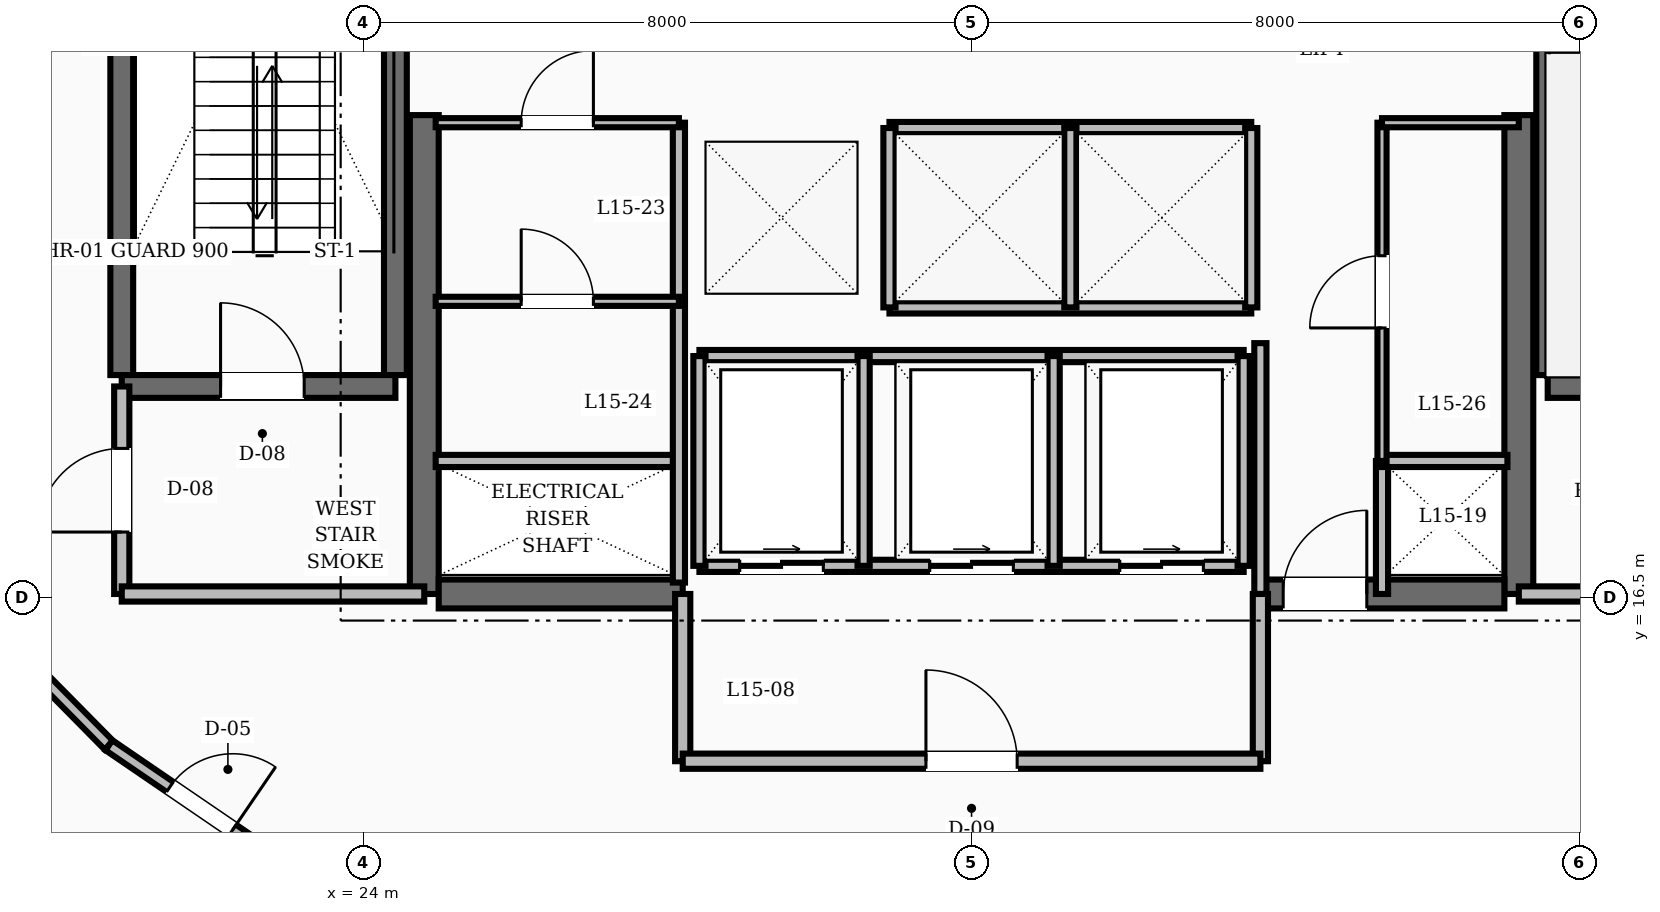
"""IFC4 building model, lengths in metres.
Left out: names, types, materials, properties, quantities, classifications, styles, units other than length and angle.
Written with IfcOpenShell. Run it as: python <this file> out.ifc"""

import sys

from ifc_helpers import new_model, si_unit, direction, frame, frame_2d, origin, place, context, subcontext, project, spatial, rectangle, extrude, element, fill, save


model = new_model("IFC4")
c1 = context("Model", 3, precision=1e-05, world=origin(), true_north=direction((0.0, 1.0)))
c2 = subcontext(c1, "Body", "Model", "MODEL_VIEW")
j1 = project(units=[si_unit("LENGTHUNIT", "METRE"), si_unit("PLANEANGLEUNIT", "RADIAN")], contexts=[c1])
p1 = place(None, origin())
s1 = spatial("IfcSite", under=j1, at=p1, CompositionType="ELEMENT")
p2 = place(p1, origin())
s2 = spatial("IfcBuilding", under=s1, at=p2, CompositionType="ELEMENT")
p3 = place(p2, frame((0.0, 0.0, 62.8)))
s3 = spatial("IfcBuildingStorey", under=s2, at=p3, CompositionType="ELEMENT", Elevation=62.8)
for number, where, z_axis, x_axis in (
    (1, (24.8, 16.55, 0.0), (0.0, 0.0, 1.0), (0.0, 1.0, 0.0)),
    (2, (39.2, 16.55, 0.0), (0.0, 0.0, 1.0), (0.0, 1.0, 0.0)),
):
    element("IfcWall", number, at=place(p3, frame(where, z_axis=z_axis, x_axis=x_axis)), inside=s3, PredefinedType="SHEAR", context=c2, shape_type="SweptSolid", body=[
        extrude(rectangle(XDim=6.3, YDim=0.38, at=frame_2d((3.15, 0.0))), origin(), (0.0, 0.0, 1.0), 3.6),
    ])
p4 = place(p3, frame((24.99, 16.55, 0.0), z_axis=(0.0, 0.0, 1.0), x_axis=(1.0, 0.0, 0.0)))
e3 = element("IfcWall", 3, at=p4, inside=s3, PredefinedType="SHEAR", context=c2, shape_type="SweptSolid", body=[
    extrude(rectangle(XDim=3.21, YDim=0.38, at=frame_2d((1.605, 0.0))), origin(), (0.0, 0.0, 1.0), 3.6),
])
p5 = place(p3, frame((35.8, 16.55, 0.0), z_axis=(0.0, 0.0, 1.0), x_axis=(1.0, 0.0, 0.0)))
e4 = element("IfcWall", 4, at=p5, inside=s3, PredefinedType="SHEAR", context=c2, shape_type="SweptSolid", body=[
    extrude(rectangle(XDim=3.21, YDim=0.38, at=frame_2d((1.605, 0.0))), origin(), (0.0, 0.0, 1.0), 3.6),
])
p6 = place(p5, frame((0.3, 0.0, 0.0)))
e5 = element("IfcOpeningElement", 5, at=p6, cuts=e4, PredefinedType="OPENING", context=c2, shape_type="SweptSolid", body=[
    extrude(rectangle(XDim=1.1, YDim=2.1, at=frame_2d((0.55, 1.05))), frame((0.0, 0.2, 0.0), z_axis=(0.0, -1.0, 0.0), x_axis=(1.0, 0.0, 0.0)), (0.0, 0.0, 1.0), 0.4),
])
for number, where, z_axis, x_axis in (
    (6, (20.82, 19.43, 0.0), (0.0, 0.0, 1.0), (0.0, 1.0, 0.0)),
    (7, (24.42, 19.43, 0.0), (0.0, 0.0, 1.0), (0.0, 1.0, 0.0)),
):
    element("IfcWall", number, at=place(p3, frame(where, z_axis=z_axis, x_axis=x_axis)), inside=s3, PredefinedType="SHEAR", context=c2, shape_type="SweptSolid", body=[
        extrude(rectangle(XDim=8.74, YDim=0.3, at=frame_2d((4.37, 0.0))), origin(), (0.0, 0.0, 1.0), 3.6),
    ])
p7 = place(p3, frame((20.82, 19.28, 0.0), z_axis=(0.0, 0.0, 1.0), x_axis=(1.0, 0.0, 0.0)))
e8 = element("IfcWall", 8, at=p7, inside=s3, PredefinedType="SHEAR", context=c2, shape_type="SweptSolid", body=[
    extrude(rectangle(XDim=3.6, YDim=0.3, at=frame_2d((1.8, 0.0))), origin(), (0.0, 0.0, 1.0), 3.6),
])
p8 = place(p7, frame((1.3, 0.0, 0.0)))
e9 = element("IfcOpeningElement", 9, at=p8, cuts=e8, PredefinedType="OPENING", context=c2, shape_type="SweptSolid", body=[
    extrude(rectangle(XDim=1.1, YDim=2.1, at=frame_2d((0.55, 1.05))), frame((0.0, 0.16, 0.0), z_axis=(0.0, -1.0, 0.0), x_axis=(1.0, 0.0, 0.0)), (0.0, 0.0, 1.0), 0.32),
])
p9 = place(p3, frame((39.58, 19.43, 0.0), z_axis=(0.0, 0.0, 1.0), x_axis=(0.0, 1.0, 0.0)))
e10 = element("IfcWall", 10, at=p9, inside=s3, PredefinedType="SHEAR", context=c2, shape_type="SweptSolid", body=[
    extrude(rectangle(XDim=8.74, YDim=0.3, at=frame_2d((4.37, 0.0))), origin(), (0.0, 0.0, 1.0), 3.6),
])
p10 = place(p3, frame((39.58, 19.28, 0.0), z_axis=(0.0, 0.0, 1.0), x_axis=(1.0, 0.0, 0.0)))
e11 = element("IfcWall", 11, at=p10, inside=s3, PredefinedType="SHEAR", context=c2, shape_type="SweptSolid", body=[
    extrude(rectangle(XDim=3.6, YDim=0.3, at=frame_2d((1.8, 0.0))), origin(), (0.0, 0.0, 1.0), 3.6),
])
p11 = place(p3, frame((20.82, 16.55, 0.0), z_axis=(0.0, 0.0, 1.0), x_axis=(0.0, 1.0, 0.0)))
e12 = element("IfcWall", 12, at=p11, inside=s3, PredefinedType="SOLIDWALL", context=c2, shape_type="SweptSolid", body=[
    extrude(rectangle(XDim=2.73, YDim=0.2, at=frame_2d((1.365, 0.0))), origin(), (0.0, 0.0, 1.0), 2.71),
])
p12 = place(p11, frame((0.815, 0.0, 0.0)))
e13 = element("IfcOpeningElement", 13, at=p12, cuts=e12, PredefinedType="OPENING", context=c2, shape_type="SweptSolid", body=[
    extrude(rectangle(XDim=1.1, YDim=2.1, at=frame_2d((0.55, 1.05))), frame((0.0, 0.11, 0.0), z_axis=(0.0, -1.0, 0.0), x_axis=(1.0, 0.0, 0.0)), (0.0, 0.0, 1.0), 0.22),
])
for number, where, z_axis, x_axis in (
    (14, (20.82, 16.55, 0.0), (0.0, 0.0, 1.0), (1.0, 0.0, 0.0)),
    (15, (39.2, 16.55, 0.0), (0.0, 0.0, 1.0), (1.0, 0.0, 0.0)),
):
    element("IfcWall", number, at=place(p3, frame(where, z_axis=z_axis, x_axis=x_axis)), inside=s3, PredefinedType="SOLIDWALL", context=c2, shape_type="SweptSolid", body=[
        extrude(rectangle(XDim=3.98, YDim=0.2, at=frame_2d((1.99, 0.0))), origin(), (0.0, 0.0, 1.0), 2.71),
    ])
p13 = place(p3, frame((35.8, 16.55, 0.0), z_axis=(0.0, 0.0, 1.0), x_axis=(0.0, 1.0, 0.0)))
e16 = element("IfcWall", 16, at=p13, inside=s3, PredefinedType="SOLIDWALL", context=c2, shape_type="SweptSolid", body=[
    extrude(rectangle(XDim=3.3, YDim=0.16, at=frame_2d((1.65, 0.0))), origin(), (0.0, 0.0, 1.0), 2.71),
])
p14 = place(p3, frame((37.4, 16.55, 0.0), z_axis=(0.0, 0.0, 1.0), x_axis=(0.0, 1.0, 0.0)))
e17 = element("IfcWall", 17, at=p14, inside=s3, PredefinedType="SOLIDWALL", context=c2, shape_type="SweptSolid", body=[
    extrude(rectangle(XDim=1.75, YDim=0.16, at=frame_2d((0.875, 0.0))), origin(), (0.0, 0.0, 1.0), 2.71),
])
for number, where, z_axis, x_axis in (
    (18, (28.2, 14.35, 0.0), (0.0, 0.0, 1.0), (0.0, 1.0, 0.0)),
    (19, (35.8, 14.35, 0.0), (0.0, 0.0, 1.0), (0.0, 1.0, 0.0)),
):
    element("IfcWall", number, at=place(p3, frame(where, z_axis=z_axis, x_axis=x_axis)), inside=s3, PredefinedType="SOLIDWALL", context=c2, shape_type="SweptSolid", body=[
        extrude(rectangle(XDim=2.2, YDim=0.2, at=frame_2d((1.1, 0.0))), origin(), (0.0, 0.0, 1.0), 2.71),
    ])
p15 = place(p3, frame((28.2, 14.35, 0.0), z_axis=(0.0, 0.0, 1.0), x_axis=(1.0, 0.0, 0.0)))
e20 = element("IfcWall", 20, at=p15, inside=s3, PredefinedType="SOLIDWALL", context=c2, shape_type="SweptSolid", body=[
    extrude(rectangle(XDim=7.6, YDim=0.2, at=frame_2d((3.8, 0.0))), origin(), (0.0, 0.0, 1.0), 2.71),
])
p16 = place(p15, frame((3.2, 0.0, 0.0)))
e21 = element("IfcOpeningElement", 21, at=p16, cuts=e20, PredefinedType="OPENING", context=c2, shape_type="SweptSolid", body=[
    extrude(rectangle(XDim=1.2, YDim=2.1, at=frame_2d((0.6, 1.05))), frame((0.0, 0.11, 0.0), z_axis=(0.0, -1.0, 0.0), x_axis=(1.0, 0.0, 0.0)), (0.0, 0.0, 1.0), 0.22),
])
for number, where, z_axis, x_axis in (
    (22, (30.92, 22.68, 0.0), (0.0, 0.0, 1.0), (1.0, 0.0, 0.0)),
    (23, (30.92, 20.32, 0.0), (0.0, 0.0, 1.0), (1.0, 0.0, 0.0)),
):
    element("IfcWall", number, at=place(p3, frame(where, z_axis=z_axis, x_axis=x_axis)), inside=s3, PredefinedType="SOLIDWALL", context=c2, shape_type="SweptSolid", body=[
        extrude(rectangle(XDim=4.76, YDim=0.16, at=frame_2d((2.38, 0.0))), origin(), (0.0, 0.0, 1.0), 2.71),
    ])
for number, where, z_axis, x_axis in (
    (24, (30.92, 20.32, 0.0), (0.0, 0.0, 1.0), (0.0, 1.0, 0.0)),
    (25, (33.3, 20.32, 0.0), (0.0, 0.0, 1.0), (0.0, 1.0, 0.0)),
    (26, (35.68, 20.32, 0.0), (0.0, 0.0, 1.0), (0.0, 1.0, 0.0)),
):
    element("IfcWall", number, at=place(p3, frame(where, z_axis=z_axis, x_axis=x_axis)), inside=s3, PredefinedType="SOLIDWALL", context=c2, shape_type="SweptSolid", body=[
        extrude(rectangle(XDim=2.36, YDim=0.16, at=frame_2d((1.18, 0.0))), origin(), (0.0, 0.0, 1.0), 2.71),
    ])
p17 = place(p3, frame((28.42, 16.92, 0.0), z_axis=(0.0, 0.0, 1.0), x_axis=(1.0, 0.0, 0.0)))
e27 = element("IfcWall", 27, at=p17, inside=s3, PredefinedType="SOLIDWALL", context=c2, shape_type="SweptSolid", body=[
    extrude(rectangle(XDim=7.16, YDim=0.16, at=frame_2d((3.58, 0.0))), origin(), (0.0, 0.0, 1.0), 2.71),
])
p18 = place(p17, frame((0.53, 0.0, 0.0)))
e28 = element("IfcOpeningElement", 28, at=p18, cuts=e27, PredefinedType="OPENING", context=c2, shape_type="SweptSolid", body=[
    extrude(rectangle(XDim=1.1, YDim=2.15, at=frame_2d((0.55, 1.075))), frame((0.0, 0.09, 0.0), z_axis=(0.0, -1.0, 0.0), x_axis=(1.0, 0.0, 0.0)), (0.0, 0.0, 1.0), 0.18),
])
p19 = place(p17, frame((3.03, 0.0, 0.0)))
e29 = element("IfcOpeningElement", 29, at=p19, cuts=e27, PredefinedType="OPENING", context=c2, shape_type="SweptSolid", body=[
    extrude(rectangle(XDim=1.1, YDim=2.15, at=frame_2d((0.55, 1.075))), frame((0.0, 0.09, 0.0), z_axis=(0.0, -1.0, 0.0), x_axis=(1.0, 0.0, 0.0)), (0.0, 0.0, 1.0), 0.18),
])
p20 = place(p17, frame((5.53, 0.0, 0.0)))
e30 = element("IfcOpeningElement", 30, at=p20, cuts=e27, PredefinedType="OPENING", context=c2, shape_type="SweptSolid", body=[
    extrude(rectangle(XDim=1.1, YDim=2.15, at=frame_2d((0.55, 1.075))), frame((0.0, 0.09, 0.0), z_axis=(0.0, -1.0, 0.0), x_axis=(1.0, 0.0, 0.0)), (0.0, 0.0, 1.0), 0.18),
])
p21 = place(p3, frame((28.42, 19.68, 0.0), z_axis=(0.0, 0.0, 1.0), x_axis=(1.0, 0.0, 0.0)))
e31 = element("IfcWall", 31, at=p21, inside=s3, PredefinedType="SOLIDWALL", context=c2, shape_type="SweptSolid", body=[
    extrude(rectangle(XDim=7.16, YDim=0.16, at=frame_2d((3.58, 0.0))), origin(), (0.0, 0.0, 1.0), 2.71),
])
for number, where, z_axis, x_axis in (
    (32, (28.42, 16.92, 0.0), (0.0, 0.0, 1.0), (0.0, 1.0, 0.0)),
    (33, (30.58, 16.92, 0.0), (0.0, 0.0, 1.0), (0.0, 1.0, 0.0)),
    (34, (33.08, 16.92, 0.0), (0.0, 0.0, 1.0), (0.0, 1.0, 0.0)),
    (35, (35.58, 16.92, 0.0), (0.0, 0.0, 1.0), (0.0, 1.0, 0.0)),
):
    element("IfcWall", number, at=place(p3, frame(where, z_axis=z_axis, x_axis=x_axis)), inside=s3, PredefinedType="SOLIDWALL", context=c2, shape_type="SweptSolid", body=[
        extrude(rectangle(XDim=2.76, YDim=0.16, at=frame_2d((1.38, 0.0))), origin(), (0.0, 0.0, 1.0), 2.71),
    ])
p22 = place(p3, frame((24.95, 18.3, 0.0), z_axis=(0.0, 0.0, 1.0), x_axis=(1.0, 0.0, 0.0)))
e36 = element("IfcWall", 36, at=p22, inside=s3, PredefinedType="SOLIDWALL", context=c2, shape_type="SweptSolid", body=[
    extrude(rectangle(XDim=3.2, YDim=0.16, at=frame_2d((1.6, 0.0))), origin(), (0.0, 0.0, 1.0), 2.71),
])
p23 = place(p3, frame((28.15, 16.7, 0.0), z_axis=(0.0, 0.0, 1.0), x_axis=(0.0, 1.0, 0.0)))
e37 = element("IfcWall", 37, at=p23, inside=s3, PredefinedType="SOLIDWALL", context=c2, shape_type="SweptSolid", body=[
    extrude(rectangle(XDim=6.05, YDim=0.16, at=frame_2d((3.025, 0.0))), origin(), (0.0, 0.0, 1.0), 2.71),
])
p24 = place(p3, frame((37.4, 18.3, 0.0), z_axis=(0.0, 0.0, 1.0), x_axis=(1.0, 0.0, 0.0)))
e38 = element("IfcWall", 38, at=p24, inside=s3, PredefinedType="SOLIDWALL", context=c2, shape_type="SweptSolid", body=[
    extrude(rectangle(XDim=1.65, YDim=0.16, at=frame_2d((0.825, 0.0))), origin(), (0.0, 0.0, 1.0), 2.71),
])
p25 = place(p3, frame((24.95, 22.75, 0.0), z_axis=(0.0, 0.0, 1.0), x_axis=(1.0, 0.0, 0.0)))
e39 = element("IfcWall", 39, at=p25, inside=s3, PredefinedType="PARTITIONING", context=c2, shape_type="SweptSolid", body=[
    extrude(rectangle(XDim=3.2, YDim=0.12, at=frame_2d((1.6, 0.0))), origin(), (0.0, 0.0, 1.0), 2.71),
])
p26 = place(p25, frame((1.125, 0.0, 0.0)))
e40 = element("IfcOpeningElement", 40, at=p26, cuts=e39, PredefinedType="OPENING", context=c2, shape_type="SweptSolid", body=[
    extrude(rectangle(XDim=0.95, YDim=2.1, at=frame_2d((0.475, 1.05))), frame((0.0, 0.07, 0.0), z_axis=(0.0, -1.0, 0.0), x_axis=(1.0, 0.0, 0.0)), (0.0, 0.0, 1.0), 0.14),
])
p27 = place(p3, frame((37.4, 18.3, 0.0), z_axis=(0.0, 0.0, 1.0), x_axis=(0.0, 1.0, 0.0)))
e41 = element("IfcWall", 41, at=p27, inside=s3, PredefinedType="PARTITIONING", context=c2, shape_type="SweptSolid", body=[
    extrude(rectangle(XDim=4.45, YDim=0.12, at=frame_2d((2.225, 0.0))), origin(), (0.0, 0.0, 1.0), 2.71),
])
p28 = place(p27, frame((1.75, 0.0, 0.0)))
e42 = element("IfcOpeningElement", 42, at=p28, cuts=e41, PredefinedType="OPENING", context=c2, shape_type="SweptSolid", body=[
    extrude(rectangle(XDim=0.95, YDim=2.1, at=frame_2d((0.475, 1.05))), frame((0.0, 0.07, 0.0), z_axis=(0.0, -1.0, 0.0), x_axis=(1.0, 0.0, 0.0)), (0.0, 0.0, 1.0), 0.14),
])
p29 = place(p3, frame((37.4, 22.75, 0.0), z_axis=(0.0, 0.0, 1.0), x_axis=(1.0, 0.0, 0.0)))
e43 = element("IfcWall", 43, at=p29, inside=s3, PredefinedType="PARTITIONING", context=c2, shape_type="SweptSolid", body=[
    extrude(rectangle(XDim=1.8, YDim=0.12, at=frame_2d((0.9, 0.0))), origin(), (0.0, 0.0, 1.0), 2.71),
])
p30 = place(p3, frame((24.95, 20.4, 0.0), z_axis=(0.0, 0.0, 1.0), x_axis=(1.0, 0.0, 0.0)))
e44 = element("IfcWall", 44, at=p30, inside=s3, PredefinedType="PARTITIONING", context=c2, shape_type="SweptSolid", body=[
    extrude(rectangle(XDim=3.2, YDim=0.12, at=frame_2d((1.6, 0.0))), origin(), (0.0, 0.0, 1.0), 2.71),
])
p31 = place(p30, frame((1.125, 0.0, 0.0)))
e45 = element("IfcOpeningElement", 45, at=p31, cuts=e44, PredefinedType="OPENING", context=c2, shape_type="SweptSolid", body=[
    extrude(rectangle(XDim=0.95, YDim=2.1, at=frame_2d((0.475, 1.05))), frame((0.0, 0.07, 0.0), z_axis=(0.0, -1.0, 0.0), x_axis=(1.0, 0.0, 0.0)), (0.0, 0.0, 1.0), 0.14),
])
p32 = place(p3, frame((18.655, 16.583, 0.0), z_axis=(0.0, 0.0, 1.0), x_axis=(0.702366174226, -0.711815816981, 0.0)))
e46 = element("IfcWall", 46, at=p32, inside=s3, PredefinedType="SOLIDWALL", context=c2, shape_type="SweptSolid", body=[
    extrude(rectangle(XDim=2.842, YDim=0.16, at=frame_2d((1.421, 0.0))), origin(), (0.0, 0.0, 1.0), 2.71),
])
p33 = place(p3, frame((20.651, 14.56, 0.0), z_axis=(0.0, 0.0, 1.0), x_axis=(0.825929039072, -0.563774088104, 0.0)))
e47 = element("IfcWall", 47, at=p33, inside=s3, PredefinedType="SOLIDWALL", context=c2, shape_type="SweptSolid", body=[
    extrude(rectangle(XDim=2.945, YDim=0.16, at=frame_2d((1.472, 0.0))), origin(), (0.0, 0.0, 1.0), 2.71),
])
p34 = place(p33, frame((0.972, 0.0, 0.0)))
e48 = element("IfcOpeningElement", 48, at=p34, cuts=e47, PredefinedType="OPENING", context=c2, shape_type="SweptSolid", body=[
    extrude(rectangle(XDim=1.0, YDim=2.1, at=frame_2d((0.5, 1.05))), frame((0.0, 0.09, 0.0), z_axis=(0.0, -1.0, 0.0), x_axis=(1.0, 0.0, 0.0)), (0.0, 0.0, 1.0), 0.18),
])
p35 = place(p8, origin())
e49 = element("IfcDoor", 49, at=p35, inside=s3, OperationType="SINGLE_SWING_LEFT", PredefinedType="DOOR", context=c2, shape_type="SweptSolid", body=[
    extrude(rectangle(XDim=1.1, YDim=2.1, at=frame_2d((0.55, 1.05))), frame((0.0, 0.025, 0.0), z_axis=(0.0, -1.0, 0.0), x_axis=(1.0, 0.0, 0.0)), (0.0, 0.0, 1.0), 0.05),
])
fill(e9, e49)
p36 = place(p12, origin())
e50 = element("IfcDoor", 50, at=p36, inside=s3, OperationType="SINGLE_SWING_LEFT", PredefinedType="DOOR", context=c2, shape_type="SweptSolid", body=[
    extrude(rectangle(XDim=1.1, YDim=2.1, at=frame_2d((0.55, 1.05))), frame((0.0, 0.025, 0.0), z_axis=(0.0, -1.0, 0.0), x_axis=(1.0, 0.0, 0.0)), (0.0, 0.0, 1.0), 0.05),
])
fill(e13, e50)
p37 = place(p6, origin())
e51 = element("IfcDoor", 51, at=p37, inside=s3, OperationType="SINGLE_SWING_RIGHT", PredefinedType="DOOR", context=c2, shape_type="SweptSolid", body=[
    extrude(rectangle(XDim=1.1, YDim=2.1, at=frame_2d((0.55, 1.05))), frame((0.0, 0.025, 0.0), z_axis=(0.0, -1.0, 0.0), x_axis=(1.0, 0.0, 0.0)), (0.0, 0.0, 1.0), 0.05),
])
fill(e5, e51)
p38 = place(p16, origin())
e52 = element("IfcDoor", 52, at=p38, inside=s3, OperationType="SINGLE_SWING_LEFT", PredefinedType="DOOR", context=c2, shape_type="SweptSolid", body=[
    extrude(rectangle(XDim=1.2, YDim=2.1, at=frame_2d((0.6, 1.05))), frame((0.0, 0.025, 0.0), z_axis=(0.0, -1.0, 0.0), x_axis=(1.0, 0.0, 0.0)), (0.0, 0.0, 1.0), 0.05),
])
fill(e21, e52)
p39 = place(p18, origin())
e53 = element("IfcDoor", 53, at=p39, inside=s3, OperationType="SLIDING_TO_RIGHT", PredefinedType="DOOR", context=c2, shape_type="SweptSolid", body=[
    extrude(rectangle(XDim=1.1, YDim=2.15, at=frame_2d((0.55, 1.075))), frame((0.0, 0.025, 0.0), z_axis=(0.0, -1.0, 0.0), x_axis=(1.0, 0.0, 0.0)), (0.0, 0.0, 1.0), 0.05),
])
fill(e28, e53)
p40 = place(p19, origin())
e54 = element("IfcDoor", 54, at=p40, inside=s3, OperationType="SLIDING_TO_RIGHT", PredefinedType="DOOR", context=c2, shape_type="SweptSolid", body=[
    extrude(rectangle(XDim=1.1, YDim=2.15, at=frame_2d((0.55, 1.075))), frame((0.0, 0.025, 0.0), z_axis=(0.0, -1.0, 0.0), x_axis=(1.0, 0.0, 0.0)), (0.0, 0.0, 1.0), 0.05),
])
fill(e29, e54)
p41 = place(p20, origin())
e55 = element("IfcDoor", 55, at=p41, inside=s3, OperationType="SLIDING_TO_RIGHT", PredefinedType="DOOR", context=c2, shape_type="SweptSolid", body=[
    extrude(rectangle(XDim=1.1, YDim=2.15, at=frame_2d((0.55, 1.075))), frame((0.0, 0.025, 0.0), z_axis=(0.0, -1.0, 0.0), x_axis=(1.0, 0.0, 0.0)), (0.0, 0.0, 1.0), 0.05),
])
fill(e30, e55)
p42 = place(p26, origin())
e56 = element("IfcDoor", 56, at=p42, inside=s3, OperationType="SINGLE_SWING_RIGHT", PredefinedType="DOOR", context=c2, shape_type="SweptSolid", body=[
    extrude(rectangle(XDim=0.95, YDim=2.1, at=frame_2d((0.475, 1.05))), frame((0.0, 0.025, 0.0), z_axis=(0.0, -1.0, 0.0), x_axis=(1.0, 0.0, 0.0)), (0.0, 0.0, 1.0), 0.05),
])
fill(e40, e56)
p43 = place(p31, origin())
e57 = element("IfcDoor", 57, at=p43, inside=s3, OperationType="SINGLE_SWING_LEFT", PredefinedType="DOOR", context=c2, shape_type="SweptSolid", body=[
    extrude(rectangle(XDim=0.95, YDim=2.1, at=frame_2d((0.475, 1.05))), frame((0.0, 0.025, 0.0), z_axis=(0.0, -1.0, 0.0), x_axis=(1.0, 0.0, 0.0)), (0.0, 0.0, 1.0), 0.05),
])
fill(e45, e57)
p44 = place(p28, origin())
e58 = element("IfcDoor", 58, at=p44, inside=s3, OperationType="SINGLE_SWING_LEFT", PredefinedType="DOOR", context=c2, shape_type="SweptSolid", body=[
    extrude(rectangle(XDim=0.95, YDim=2.1, at=frame_2d((0.475, 1.05))), frame((0.0, 0.025, 0.0), z_axis=(0.0, -1.0, 0.0), x_axis=(1.0, 0.0, 0.0)), (0.0, 0.0, 1.0), 0.05),
])
fill(e42, e58)
p45 = place(p34, origin())
e59 = element("IfcDoor", 59, at=p45, inside=s3, OperationType="SINGLE_SWING_RIGHT", PredefinedType="DOOR", context=c2, shape_type="SweptSolid", body=[
    extrude(rectangle(XDim=1.0, YDim=2.1, at=frame_2d((0.5, 1.05))), frame((0.0, 0.025, 0.0), z_axis=(0.0, -1.0, 0.0), x_axis=(1.0, 0.0, 0.0)), (0.0, 0.0, 1.0), 0.05),
])
fill(e48, e59)
save(model, sys.argv[1])
